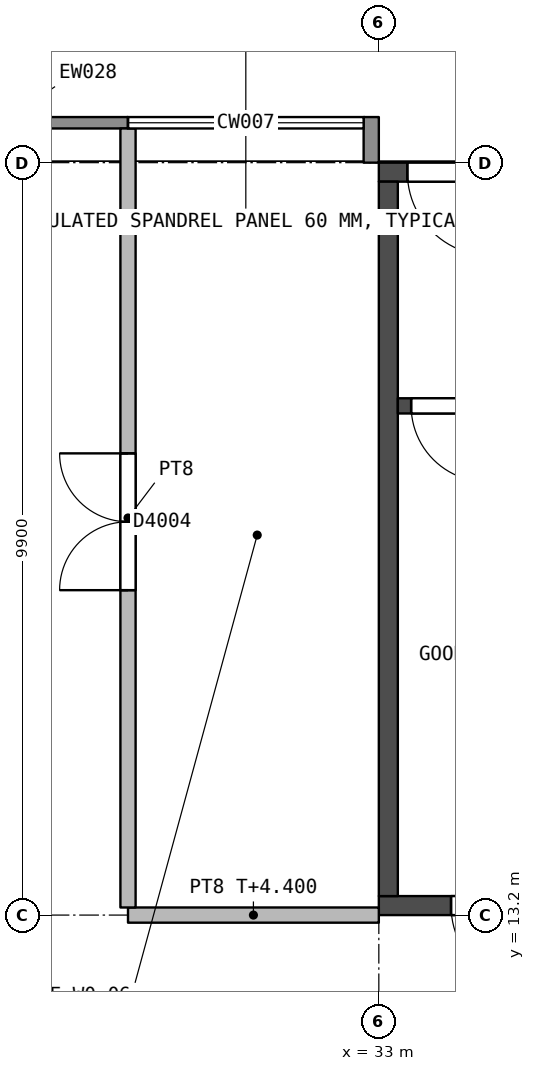
"""IFC4 building model, lengths in metres.
Left out: names, types, materials, properties, quantities, classifications, styles, units other than length and angle.
Written with IfcOpenShell. Run it as: python <this file> out.ifc"""

import sys

from ifc_helpers import new_model, si_unit, direction, frame, frame_2d, origin, place, context, subcontext, project, spatial, rectangle, extrude, element, fill, save


model = new_model("IFC4")
c1 = context("Model", 3, precision=1e-05, world=origin(), true_north=direction((0.0, 1.0)))
c2 = subcontext(c1, "Body", "Model", "MODEL_VIEW")
j1 = project(units=[si_unit("LENGTHUNIT", "METRE"), si_unit("PLANEANGLEUNIT", "RADIAN")], contexts=[c1])
p1 = place(None, origin())
s1 = spatial("IfcSite", under=j1, at=p1, CompositionType="ELEMENT")
p2 = place(p1, origin())
s2 = spatial("IfcBuilding", under=s1, at=p2, CompositionType="ELEMENT")
p3 = place(p2, origin())
s3 = spatial("IfcBuildingStorey", under=s2, at=p3, CompositionType="ELEMENT", Elevation=0.0)
p4 = place(p3, frame((33.0, 13.325, 0.0), z_axis=(0.0, 0.0, 1.0), x_axis=(1.0, 0.0, 0.0)))
e1 = element("IfcWall", 1, at=p4, inside=s3, PredefinedType="SHEAR", context=c2, shape_type="SweptSolid", body=[
    extrude(rectangle(XDim=6.6, YDim=0.25, at=frame_2d((3.3, 0.0))), origin(), (0.0, 0.0, 1.0), 5.1),
])
p5 = place(p4, frame((0.95, 0.0, 0.0)))
e2 = element("IfcOpeningElement", 2, at=p5, cuts=e1, PredefinedType="OPENING", context=c2, shape_type="SweptSolid", body=[
    extrude(rectangle(XDim=1.1, YDim=2.1, at=frame_2d((0.55, 1.05))), frame((0.0, 0.135, 0.0), z_axis=(0.0, -1.0, 0.0), x_axis=(1.0, 0.0, 0.0)), (0.0, 0.0, 1.0), 0.27),
])
p6 = place(p3, frame((33.0, 22.975, 0.0), z_axis=(0.0, 0.0, 1.0), x_axis=(1.0, 0.0, 0.0)))
e3 = element("IfcWall", 3, at=p6, inside=s3, PredefinedType="SHEAR", context=c2, shape_type="SweptSolid", body=[
    extrude(rectangle(XDim=6.6, YDim=0.25, at=frame_2d((3.3, 0.0))), origin(), (0.0, 0.0, 1.0), 5.1),
])
p7 = place(p6, frame((0.375, 0.0, 0.0)))
e4 = element("IfcOpeningElement", 4, at=p7, cuts=e3, PredefinedType="OPENING", context=c2, shape_type="SweptSolid", body=[
    extrude(rectangle(XDim=1.1, YDim=2.4, at=frame_2d((0.55, 1.2))), frame((0.0, 0.135, 0.0), z_axis=(0.0, -1.0, 0.0), x_axis=(1.0, 0.0, 0.0)), (0.0, 0.0, 1.0), 0.27),
])
p8 = place(p6, frame((4.735, 0.0, 2.05)))
e5 = element("IfcOpeningElement", 5, at=p8, cuts=e3, PredefinedType="OPENING", context=c2, shape_type="SweptSolid", body=[
    extrude(rectangle(XDim=0.9, YDim=1.2, at=frame_2d((0.45, 0.6))), frame((0.0, 0.135, 0.0), z_axis=(0.0, -1.0, 0.0), x_axis=(1.0, 0.0, 0.0)), (0.0, 0.0, 1.0), 0.27),
])
p9 = place(p3, frame((33.125, 13.45, 0.0), z_axis=(0.0, 0.0, 1.0), x_axis=(0.0, 1.0, 0.0)))
e6 = element("IfcWall", 6, at=p9, inside=s3, PredefinedType="SHEAR", context=c2, shape_type="SweptSolid", body=[
    extrude(rectangle(XDim=9.4, YDim=0.25, at=frame_2d((4.7, 0.0))), origin(), (0.0, 0.0, 1.0), 5.1),
])
p10 = place(p3, frame((33.25, 19.9, 0.0), z_axis=(0.0, 0.0, 1.0), x_axis=(1.0, 0.0, 0.0)))
e7 = element("IfcWall", 7, at=p10, inside=s3, PredefinedType="SHEAR", context=c2, shape_type="SweptSolid", body=[
    extrude(rectangle(XDim=6.1, YDim=0.2, at=frame_2d((3.05, 0.0))), origin(), (0.0, 0.0, 1.0), 5.1),
])
p11 = place(p10, frame((0.175, 0.0, 0.0)))
e8 = element("IfcOpeningElement", 8, at=p11, cuts=e7, PredefinedType="OPENING", context=c2, shape_type="SweptSolid", body=[
    extrude(rectangle(XDim=1.0, YDim=2.1, at=frame_2d((0.5, 1.05))), frame((0.0, 0.11, 0.0), z_axis=(0.0, -1.0, 0.0), x_axis=(1.0, 0.0, 0.0)), (0.0, 0.0, 1.0), 0.22),
])
p12 = place(p3, frame((26.4, 23.625, 0.0), z_axis=(0.0, 0.0, 1.0), x_axis=(1.0, 0.0, 0.0)))
e9 = element("IfcWall", 9, at=p12, inside=s3, PredefinedType="STANDARD", context=c2, shape_type="SweptSolid", body=[
    extrude(rectangle(XDim=3.3, YDim=0.15, at=frame_2d((1.65, 0.0))), origin(), (0.0, 0.0, 1.0), 5.1),
])
p13 = place(p12, frame((1.15, 0.0, 0.0)))
e10 = element("IfcOpeningElement", 10, at=p13, cuts=e9, PredefinedType="OPENING", context=c2, shape_type="SweptSolid", body=[
    extrude(rectangle(XDim=1.0, YDim=2.1, at=frame_2d((0.5, 1.05))), frame((0.0, 0.085, 0.0), z_axis=(0.0, -1.0, 0.0), x_axis=(1.0, 0.0, 0.0)), (0.0, 0.0, 1.0), 0.17),
])
p14 = place(p3, frame((32.9, 23.1, 0.0), z_axis=(0.0, 0.0, 1.0), x_axis=(0.0, 1.0, 0.0)))
e11 = element("IfcWall", 11, at=p14, inside=s3, PredefinedType="STANDARD", context=c2, shape_type="SweptSolid", body=[
    extrude(rectangle(XDim=0.6, YDim=0.2, at=frame_2d((0.3, 0.0))), origin(), (0.0, 0.0, 1.0), 4.4),
])
p15 = place(p3, frame((33.0, 13.2, 0.0), z_axis=(0.0, 0.0, 1.0), x_axis=(-1.0, 0.0, 0.0)))
e12 = element("IfcWall", 12, at=p15, inside=s3, PredefinedType="PARTITIONING", context=c2, shape_type="SweptSolid", body=[
    extrude(rectangle(XDim=3.3, YDim=0.2, at=frame_2d((1.65, 0.0))), origin(), (0.0, 0.0, 1.0), 4.4),
])
p16 = place(p3, frame((29.7, 13.3, 0.0), z_axis=(0.0, 0.0, 1.0), x_axis=(0.0, 1.0, 0.0)))
e13 = element("IfcWall", 13, at=p16, inside=s3, PredefinedType="PARTITIONING", context=c2, shape_type="SweptSolid", body=[
    extrude(rectangle(XDim=10.25, YDim=0.2, at=frame_2d((5.125, 0.0))), origin(), (0.0, 0.0, 1.0), 5.1),
])
p17 = place(p16, frame((4.175, 0.0, 0.0)))
e14 = element("IfcOpeningElement", 14, at=p17, cuts=e13, PredefinedType="OPENING", context=c2, shape_type="SweptSolid", body=[
    extrude(rectangle(XDim=1.8, YDim=2.4, at=frame_2d((0.9, 1.2))), frame((0.0, 0.11, 0.0), z_axis=(0.0, -1.0, 0.0), x_axis=(1.0, 0.0, 0.0)), (0.0, 0.0, 1.0), 0.22),
])
p18 = place(p5, origin())
e15 = element("IfcDoor", 15, at=p18, inside=s3, OperationType="SINGLE_SWING_RIGHT", PredefinedType="DOOR", context=c2, shape_type="SweptSolid", body=[
    extrude(rectangle(XDim=1.1, YDim=2.1, at=frame_2d((0.55, 1.05))), frame((0.0, 0.025, 0.0), z_axis=(0.0, -1.0, 0.0), x_axis=(1.0, 0.0, 0.0)), (0.0, 0.0, 1.0), 0.05),
])
fill(e2, e15)
p19 = place(p11, origin())
e16 = element("IfcDoor", 16, at=p19, inside=s3, OperationType="SINGLE_SWING_RIGHT", PredefinedType="DOOR", context=c2, shape_type="SweptSolid", body=[
    extrude(rectangle(XDim=1.0, YDim=2.1, at=frame_2d((0.5, 1.05))), frame((0.0, 0.025, 0.0), z_axis=(0.0, -1.0, 0.0), x_axis=(1.0, 0.0, 0.0)), (0.0, 0.0, 1.0), 0.05),
])
fill(e8, e16)
p20 = place(p7, origin())
e17 = element("IfcDoor", 17, at=p20, inside=s3, OperationType="SINGLE_SWING_RIGHT", PredefinedType="DOOR", context=c2, shape_type="SweptSolid", body=[
    extrude(rectangle(XDim=1.1, YDim=2.4, at=frame_2d((0.55, 1.2))), frame((0.0, 0.025, 0.0), z_axis=(0.0, -1.0, 0.0), x_axis=(1.0, 0.0, 0.0)), (0.0, 0.0, 1.0), 0.05),
])
fill(e4, e17)
p21 = place(p17, origin())
e18 = element("IfcDoor", 18, at=p21, inside=s3, OperationType="DOUBLE_DOOR_SINGLE_SWING", PredefinedType="DOOR", context=c2, shape_type="SweptSolid", body=[
    extrude(rectangle(XDim=1.8, YDim=2.4, at=frame_2d((0.9, 1.2))), frame((0.0, 0.03, 0.0), z_axis=(0.0, -1.0, 0.0), x_axis=(1.0, 0.0, 0.0)), (0.0, 0.0, 1.0), 0.06),
])
fill(e14, e18)
save(model, sys.argv[1])
